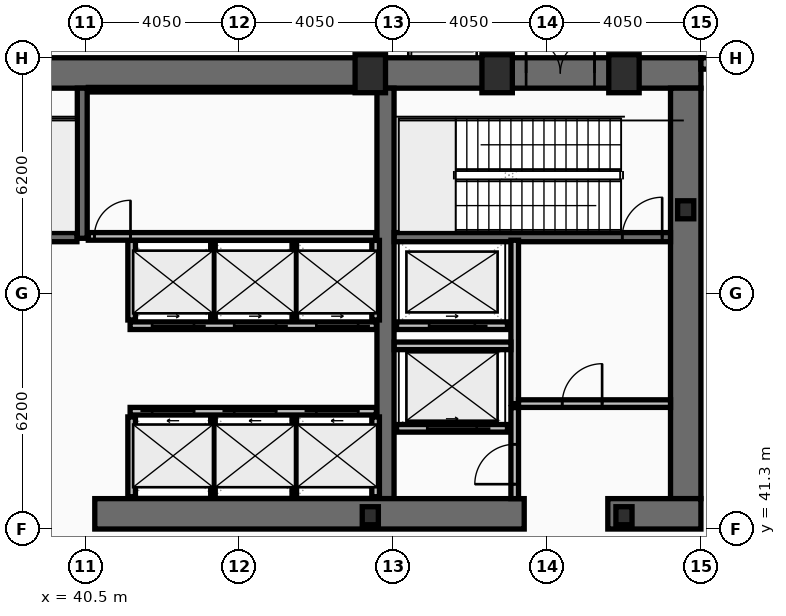
"""IFC4 building model, lengths in metres.
Left out: names, types, materials, properties, quantities, classifications, styles, units other than length and angle.
Written with IfcOpenShell. Run it as: python <this file> out.ifc"""

import sys

from ifc_helpers import new_model, si_unit, direction, frame, frame_2d, origin, origin_2d, place, context, subcontext, project, spatial, rectangle, hollow_rectangle, i_section, extrude, element, fill, save


model = new_model("IFC4")
c1 = context("Model", 3, precision=1e-05, world=origin(), true_north=direction((0.0, 1.0)))
c2 = subcontext(c1, "Body", "Model", "MODEL_VIEW")
j1 = project(units=[si_unit("LENGTHUNIT", "METRE"), si_unit("PLANEANGLEUNIT", "RADIAN")], contexts=[c1])
p1 = place(None, origin())
s1 = spatial("IfcSite", under=j1, at=p1, CompositionType="ELEMENT")
p2 = place(p1, origin())
s2 = spatial("IfcBuilding", under=s1, at=p2, CompositionType="ELEMENT")
p3 = place(p2, origin())
s3 = spatial("IfcBuildingStorey", under=s2, at=p3, CompositionType="ELEMENT", Elevation=0.0)
p4 = place(p3, frame((16.2, 53.3, 0.0), z_axis=(0.0, 0.0, 1.0), x_axis=(1.0, 0.0, 0.0)))
e1 = element("IfcWall", 1, at=p4, inside=s3, PredefinedType="SHEAR", context=c2, shape_type="SweptSolid", body=[
    extrude(rectangle(XDim=40.5, YDim=0.8, at=frame_2d((20.25, 0.0))), origin(), (0.0, 0.0, 1.0), 5.2),
])
p5 = place(p4, frame((2.8, 0.0, 0.0)))
e2 = element("IfcOpeningElement", 2, at=p5, cuts=e1, PredefinedType="OPENING", context=c2, shape_type="SweptSolid", body=[
    extrude(rectangle(XDim=1.8, YDim=2.4, at=frame_2d((0.9, 1.2))), frame((0.0, 0.41, 0.0), z_axis=(0.0, -1.0, 0.0), x_axis=(1.0, 0.0, 0.0)), (0.0, 0.0, 1.0), 0.82),
])
p6 = place(p4, frame((19.3, 0.0, 0.0)))
e3 = element("IfcOpeningElement", 3, at=p6, cuts=e1, PredefinedType="OPENING", context=c2, shape_type="SweptSolid", body=[
    extrude(rectangle(XDim=1.8, YDim=2.4, at=frame_2d((0.9, 1.2))), frame((0.0, 0.41, 0.0), z_axis=(0.0, -1.0, 0.0), x_axis=(1.0, 0.0, 0.0)), (0.0, 0.0, 1.0), 0.82),
])
p7 = place(p4, frame((35.9, 0.0, 0.0)))
e4 = element("IfcOpeningElement", 4, at=p7, cuts=e1, PredefinedType="OPENING", context=c2, shape_type="SweptSolid", body=[
    extrude(rectangle(XDim=1.8, YDim=2.4, at=frame_2d((0.9, 1.2))), frame((0.0, 0.41, 0.0), z_axis=(0.0, -1.0, 0.0), x_axis=(1.0, 0.0, 0.0)), (0.0, 0.0, 1.0), 0.82),
])
p8 = place(p3, frame((56.3, 52.9, 0.0), z_axis=(0.0, 0.0, 1.0), x_axis=(0.0, -1.0, 0.0)))
e5 = element("IfcWall", 5, at=p8, inside=s3, PredefinedType="SHEAR", context=c2, shape_type="SweptSolid", body=[
    extrude(rectangle(XDim=10.8, YDim=0.8, at=frame_2d((5.4, 0.0))), origin(), (0.0, 0.0, 1.0), 5.2),
])
p9 = place(p3, frame((48.4, 42.1, 0.0), z_axis=(0.0, 0.0, 1.0), x_axis=(0.0, 1.0, 0.0)))
e6 = element("IfcWall", 6, at=p9, inside=s3, PredefinedType="SHEAR", context=c2, shape_type="SweptSolid", body=[
    extrude(rectangle(XDim=10.8, YDim=0.45, at=frame_2d((5.4, 0.0))), origin(), (0.0, 0.0, 1.0), 5.2),
])
p10 = place(p3, frame((52.05, 41.7, 0.0), z_axis=(0.0, 0.0, 1.0), x_axis=(-1.0, 0.0, 0.0)))
e7 = element("IfcWall", 7, at=p10, inside=s3, PredefinedType="SHEAR", context=c2, shape_type="SweptSolid", body=[
    extrude(rectangle(XDim=11.3, YDim=0.8, at=frame_2d((5.65, 0.0))), origin(), (0.0, 0.0, 1.0), 5.2),
])
p11 = place(p3, frame((56.7, 41.7, 0.0), z_axis=(0.0, 0.0, 1.0), x_axis=(-1.0, 0.0, 0.0)))
e8 = element("IfcWall", 8, at=p11, inside=s3, PredefinedType="SHEAR", context=c2, shape_type="SweptSolid", body=[
    extrude(rectangle(XDim=2.45, YDim=0.8, at=frame_2d((1.225, 0.0))), origin(), (0.0, 0.0, 1.0), 5.2),
])
p12 = place(p3, frame((40.42, 48.95, 0.0), z_axis=(0.0, 0.0, 1.0), x_axis=(0.0, 1.0, 0.0)))
e9 = element("IfcWall", 9, at=p12, inside=s3, PredefinedType="SHEAR", context=c2, shape_type="SweptSolid", body=[
    extrude(rectangle(XDim=3.95, YDim=0.26, at=frame_2d((1.975, 0.0))), origin(), (0.0, 0.0, 1.0), 5.2),
])
p13 = place(p3, frame((48.63, 48.98, 0.0), z_axis=(0.0, 0.0, 1.0), x_axis=(1.0, 0.0, 0.0)))
e10 = element("IfcWall", 10, at=p13, inside=s3, PredefinedType="SHEAR", context=c2, shape_type="SweptSolid", body=[
    extrude(rectangle(XDim=7.27, YDim=0.24, at=frame_2d((3.635, 0.0))), origin(), (0.0, 0.0, 1.0), 5.2),
])
p14 = place(p13, frame((6.0, 0.0, 0.0)))
e11 = element("IfcOpeningElement", 11, at=p14, cuts=e10, PredefinedType="OPENING", context=c2, shape_type="SweptSolid", body=[
    extrude(rectangle(XDim=1.05, YDim=2.15, at=frame_2d((0.525, 1.075))), frame((0.0, 0.13, 0.0), z_axis=(0.0, -1.0, 0.0), x_axis=(1.0, 0.0, 0.0)), (0.0, 0.0, 1.0), 0.26),
])
p15 = place(p3, frame((32.72, 48.98, 0.0), z_axis=(0.0, 0.0, 1.0), x_axis=(1.0, 0.0, 0.0)))
e12 = element("IfcWall", 12, at=p15, inside=s3, PredefinedType="SHEAR", context=c2, shape_type="SweptSolid", body=[
    extrude(rectangle(XDim=7.56, YDim=0.24, at=frame_2d((3.78, 0.0))), origin(), (0.0, 0.0, 1.0), 5.2),
])
p16 = place(p15, frame((0.22, 0.0, 0.0)))
e13 = element("IfcOpeningElement", 13, at=p16, cuts=e12, PredefinedType="OPENING", context=c2, shape_type="SweptSolid", body=[
    extrude(rectangle(XDim=1.05, YDim=2.15, at=frame_2d((0.525, 1.075))), frame((0.0, 0.13, 0.0), z_axis=(0.0, -1.0, 0.0), x_axis=(1.0, 0.0, 0.0)), (0.0, 0.0, 1.0), 0.26),
])
for number, where, z_axis, x_axis in (
    (14, (48.0, 53.28, 0.0), (0.0, 0.0, 1.0), (1.0, 0.0, 0.0)),
    (15, (51.337, 53.28, 0.0), (0.0, 0.0, 1.0), (1.0, 0.0, 0.0)),
    (16, (54.675, 53.28, 0.0), (0.0, 0.0, 1.0), (1.0, 0.0, 0.0)),
):
    element("IfcColumn", number, at=place(p3, frame(where, z_axis=z_axis, x_axis=x_axis)), inside=s3, PredefinedType="COLUMN", context=c2, shape_type="SweptSolid", body=[
        extrude(hollow_rectangle(XDim=0.8, YDim=1.0, WallThickness=0.055, at=origin_2d()), origin(), (0.0, 0.0, 1.0), 5.4),
    ])
for number, where, z_axis, x_axis in (
    (17, (56.3, 49.7, 0.0), (0.0, 0.0, 1.0), (1.0, 0.0, 0.0)),
    (18, (48.0, 41.65, 0.0), (0.0, 0.0, 1.0), (1.0, 0.0, 0.0)),
    (19, (54.675, 41.65, 0.0), (0.0, 0.0, 1.0), (1.0, 0.0, 0.0)),
):
    element("IfcColumn", number, at=place(p3, frame(where, z_axis=z_axis, x_axis=x_axis)), inside=s3, PredefinedType="COLUMN", context=c2, shape_type="SweptSolid", body=[
        extrude(i_section(OverallWidth=0.424, OverallDepth=0.474, WebThickness=0.048, FlangeThickness=0.077, at=origin_2d()), origin(), (0.0, 0.0, 1.0), 5.4),
    ])
p17 = place(p3, frame((56.7, 53.55, 0.0), z_axis=(0.0, 0.0, 1.0), x_axis=(1.0, 0.0, 0.0)))
e20 = element("IfcWall", 20, at=p17, inside=s3, PredefinedType="SOLIDWALL", context=c2, shape_type="SweptSolid", body=[
    extrude(rectangle(XDim=12.325, YDim=0.3, at=frame_2d((6.163, 0.0))), origin(), (0.0, 0.0, 1.0), 4.54),
])
p18 = place(p17, frame((1.95, 0.0, 0.0)))
e21 = element("IfcOpeningElement", 21, at=p18, cuts=e20, PredefinedType="OPENING", context=c2, shape_type="SweptSolid", body=[
    extrude(rectangle(XDim=1.8, YDim=2.4, at=frame_2d((0.9, 1.2))), frame((0.0, 0.16, 0.0), z_axis=(0.0, -1.0, 0.0), x_axis=(1.0, 0.0, 0.0)), (0.0, 0.0, 1.0), 0.32),
])
p19 = place(p17, frame((7.75, 0.0, 1.0)))
e22 = element("IfcOpeningElement", 22, at=p19, cuts=e20, PredefinedType="OPENING", context=c2, shape_type="SweptSolid", body=[
    extrude(rectangle(XDim=1.2, YDim=2.8, at=frame_2d((0.6, 1.4))), frame((0.0, 0.16, 0.0), z_axis=(0.0, -1.0, 0.0), x_axis=(1.0, 0.0, 0.0)), (0.0, 0.0, 1.0), 0.32),
])
p20 = place(p3, frame((41.68, 44.4, 0.0), z_axis=(0.0, 0.0, 1.0), x_axis=(1.0, 0.0, 0.0)))
e23 = element("IfcWall", 23, at=p20, inside=s3, PredefinedType="PARTITIONING", context=c2, shape_type="SweptSolid", body=[
    extrude(rectangle(XDim=6.48, YDim=0.2, at=frame_2d((3.24, 0.0))), origin(), (0.0, 0.0, 1.0), 5.2),
])
p21 = place(p20, frame((0.58, 0.0, 0.0)))
e24 = element("IfcOpeningElement", 24, at=p21, cuts=e23, PredefinedType="OPENING", context=c2, shape_type="SweptSolid", body=[
    extrude(rectangle(XDim=1.1, YDim=2.18, at=frame_2d((0.55, 1.09))), frame((0.0, 0.11, 0.0), z_axis=(0.0, -1.0, 0.0), x_axis=(1.0, 0.0, 0.0)), (0.0, 0.0, 1.0), 0.22),
])
p22 = place(p20, frame((2.74, 0.0, 0.0)))
e25 = element("IfcOpeningElement", 25, at=p22, cuts=e23, PredefinedType="OPENING", context=c2, shape_type="SweptSolid", body=[
    extrude(rectangle(XDim=1.1, YDim=2.18, at=frame_2d((0.55, 1.09))), frame((0.0, 0.11, 0.0), z_axis=(0.0, -1.0, 0.0), x_axis=(1.0, 0.0, 0.0)), (0.0, 0.0, 1.0), 0.22),
])
p23 = place(p20, frame((4.9, 0.0, 0.0)))
e26 = element("IfcOpeningElement", 26, at=p23, cuts=e23, PredefinedType="OPENING", context=c2, shape_type="SweptSolid", body=[
    extrude(rectangle(XDim=1.1, YDim=2.18, at=frame_2d((0.55, 1.09))), frame((0.0, 0.11, 0.0), z_axis=(0.0, -1.0, 0.0), x_axis=(1.0, 0.0, 0.0)), (0.0, 0.0, 1.0), 0.22),
])
p24 = place(p3, frame((51.61, 43.95, 0.0), z_axis=(0.0, 0.0, 1.0), x_axis=(-1.0, 0.0, 0.0)))
e27 = element("IfcWall", 27, at=p24, inside=s3, PredefinedType="PARTITIONING", context=c2, shape_type="SweptSolid", body=[
    extrude(rectangle(XDim=2.92, YDim=0.2, at=frame_2d((1.46, 0.0))), origin(), (0.0, 0.0, 1.0), 5.2),
])
p25 = place(p24, frame((0.81, 0.0, 0.0)))
e28 = element("IfcOpeningElement", 28, at=p25, cuts=e27, PredefinedType="OPENING", context=c2, shape_type="SweptSolid", body=[
    extrude(rectangle(XDim=1.3, YDim=2.18, at=frame_2d((0.65, 1.09))), frame((0.0, 0.11, 0.0), z_axis=(0.0, -1.0, 0.0), x_axis=(1.0, 0.0, 0.0)), (0.0, 0.0, 1.0), 0.22),
])
p26 = place(p3, frame((51.61, 46.65, 0.0), z_axis=(0.0, 0.0, 1.0), x_axis=(-1.0, 0.0, 0.0)))
e29 = element("IfcWall", 29, at=p26, inside=s3, PredefinedType="PARTITIONING", context=c2, shape_type="SweptSolid", body=[
    extrude(rectangle(XDim=2.92, YDim=0.2, at=frame_2d((1.46, 0.0))), origin(), (0.0, 0.0, 1.0), 5.2),
])
p27 = place(p26, frame((0.86, 0.0, 0.0)))
e30 = element("IfcOpeningElement", 30, at=p27, cuts=e29, PredefinedType="OPENING", context=c2, shape_type="SweptSolid", body=[
    extrude(rectangle(XDim=1.2, YDim=2.18, at=frame_2d((0.6, 1.09))), frame((0.0, 0.11, 0.0), z_axis=(0.0, -1.0, 0.0), x_axis=(1.0, 0.0, 0.0)), (0.0, 0.0, 1.0), 0.22),
])
p28 = place(p3, frame((48.16, 46.65, 0.0), z_axis=(0.0, 0.0, 1.0), x_axis=(-1.0, 0.0, 0.0)))
e31 = element("IfcWall", 31, at=p28, inside=s3, PredefinedType="PARTITIONING", context=c2, shape_type="SweptSolid", body=[
    extrude(rectangle(XDim=6.48, YDim=0.2, at=frame_2d((3.24, 0.0))), origin(), (0.0, 0.0, 1.0), 5.2),
])
p29 = place(p28, frame((4.8, 0.0, 0.0)))
e32 = element("IfcOpeningElement", 32, at=p29, cuts=e31, PredefinedType="OPENING", context=c2, shape_type="SweptSolid", body=[
    extrude(rectangle(XDim=1.1, YDim=2.18, at=frame_2d((0.55, 1.09))), frame((0.0, 0.11, 0.0), z_axis=(0.0, -1.0, 0.0), x_axis=(1.0, 0.0, 0.0)), (0.0, 0.0, 1.0), 0.22),
])
p30 = place(p28, frame((2.64, 0.0, 0.0)))
e33 = element("IfcOpeningElement", 33, at=p30, cuts=e31, PredefinedType="OPENING", context=c2, shape_type="SweptSolid", body=[
    extrude(rectangle(XDim=1.1, YDim=2.18, at=frame_2d((0.55, 1.09))), frame((0.0, 0.11, 0.0), z_axis=(0.0, -1.0, 0.0), x_axis=(1.0, 0.0, 0.0)), (0.0, 0.0, 1.0), 0.22),
])
p31 = place(p28, frame((0.48, 0.0, 0.0)))
e34 = element("IfcOpeningElement", 34, at=p31, cuts=e31, PredefinedType="OPENING", context=c2, shape_type="SweptSolid", body=[
    extrude(rectangle(XDim=1.1, YDim=2.18, at=frame_2d((0.55, 1.09))), frame((0.0, 0.11, 0.0), z_axis=(0.0, -1.0, 0.0), x_axis=(1.0, 0.0, 0.0)), (0.0, 0.0, 1.0), 0.22),
])
p32 = place(p3, frame((51.8, 44.6, 0.0), z_axis=(0.0, 0.0, 1.0), x_axis=(0.0, 1.0, 0.0)))
e35 = element("IfcWall", 35, at=p32, inside=s3, PredefinedType="PARTITIONING", context=c2, shape_type="SweptSolid", body=[
    extrude(rectangle(XDim=4.3, YDim=0.2, at=frame_2d((2.15, 0.0))), origin(), (0.0, 0.0, 1.0), 5.2),
])
p33 = place(p3, frame((51.9, 44.6, 0.0), z_axis=(0.0, 0.0, 1.0), x_axis=(1.0, 0.0, 0.0)))
e36 = element("IfcWall", 36, at=p33, inside=s3, PredefinedType="PARTITIONING", context=c2, shape_type="SweptSolid", body=[
    extrude(rectangle(XDim=4.0, YDim=0.2, at=frame_2d((2.0, 0.0))), origin(), (0.0, 0.0, 1.0), 5.2),
])
p34 = place(p33, frame((1.15, 0.0, 0.0)))
e37 = element("IfcOpeningElement", 37, at=p34, cuts=e36, PredefinedType="OPENING", context=c2, shape_type="SweptSolid", body=[
    extrude(rectangle(XDim=1.05, YDim=2.15, at=frame_2d((0.525, 1.075))), frame((0.0, 0.11, 0.0), z_axis=(0.0, -1.0, 0.0), x_axis=(1.0, 0.0, 0.0)), (0.0, 0.0, 1.0), 0.22),
])
p35 = place(p3, frame((48.63, 46.12, 0.0), z_axis=(0.0, 0.0, 1.0), x_axis=(1.0, 0.0, 0.0)))
e38 = element("IfcWall", 38, at=p35, inside=s3, PredefinedType="PARTITIONING", context=c2, shape_type="SweptSolid", body=[
    extrude(rectangle(XDim=3.07, YDim=0.2, at=frame_2d((1.535, 0.0))), origin(), (0.0, 0.0, 1.0), 5.2),
])
p36 = place(p3, frame((51.8, 42.1, 0.0), z_axis=(0.0, 0.0, 1.0), x_axis=(0.0, 1.0, 0.0)))
e39 = element("IfcWall", 39, at=p36, inside=s3, PredefinedType="PARTITIONING", context=c2, shape_type="SweptSolid", body=[
    extrude(rectangle(XDim=2.395, YDim=0.2, at=frame_2d((1.198, 0.0))), origin(), (0.0, 0.0, 1.0), 5.2),
])
p37 = place(p36, frame((0.38, 0.0, 0.0)))
e40 = element("IfcOpeningElement", 40, at=p37, cuts=e39, PredefinedType="OPENING", context=c2, shape_type="SweptSolid", body=[
    extrude(rectangle(XDim=1.05, YDim=2.15, at=frame_2d((0.525, 1.075))), frame((0.0, 0.11, 0.0), z_axis=(0.0, -1.0, 0.0), x_axis=(1.0, 0.0, 0.0)), (0.0, 0.0, 1.0), 0.22),
])
for number, where, z_axis, x_axis in (
    (41, (41.72, 46.8, 0.0), (0.0, 0.0, 1.0), (0.0, 1.0, 0.0)),
    (42, (48.14, 46.8, 0.0), (0.0, 0.0, 1.0), (0.0, 1.0, 0.0)),
):
    element("IfcWall", number, at=place(p3, frame(where, z_axis=z_axis, x_axis=x_axis)), inside=s3, PredefinedType="PARTITIONING", context=c2, shape_type="SweptSolid", body=[
        extrude(rectangle(XDim=2.095, YDim=0.2, at=frame_2d((1.047, 0.0))), origin(), (0.0, 0.0, 1.0), 5.2),
    ])
for number, where, z_axis, x_axis in (
    (43, (43.86, 46.8, 0.0), (0.0, 0.0, 1.0), (0.0, 1.0, 0.0)),
    (44, (46.0, 46.8, 0.0), (0.0, 0.0, 1.0), (0.0, 1.0, 0.0)),
):
    element("IfcWall", number, at=place(p3, frame(where, z_axis=z_axis, x_axis=x_axis)), inside=s3, PredefinedType="PARTITIONING", context=c2, shape_type="SweptSolid", body=[
        extrude(rectangle(XDim=2.095, YDim=0.12, at=frame_2d((1.047, 0.0))), origin(), (0.0, 0.0, 1.0), 5.2),
    ])
for number, where, z_axis, x_axis in (
    (45, (41.72, 42.15, 0.0), (0.0, 0.0, 1.0), (0.0, 1.0, 0.0)),
    (46, (48.14, 42.15, 0.0), (0.0, 0.0, 1.0), (0.0, 1.0, 0.0)),
):
    element("IfcWall", number, at=place(p3, frame(where, z_axis=z_axis, x_axis=x_axis)), inside=s3, PredefinedType="PARTITIONING", context=c2, shape_type="SweptSolid", body=[
        extrude(rectangle(XDim=2.1, YDim=0.2, at=frame_2d((1.05, 0.0))), origin(), (0.0, 0.0, 1.0), 5.2),
    ])
for number, where, z_axis, x_axis in (
    (47, (43.86, 42.15, 0.0), (0.0, 0.0, 1.0), (0.0, 1.0, 0.0)),
    (48, (46.0, 42.15, 0.0), (0.0, 0.0, 1.0), (0.0, 1.0, 0.0)),
):
    element("IfcWall", number, at=place(p3, frame(where, z_axis=z_axis, x_axis=x_axis)), inside=s3, PredefinedType="PARTITIONING", context=c2, shape_type="SweptSolid", body=[
        extrude(rectangle(XDim=2.1, YDim=0.12, at=frame_2d((1.05, 0.0))), origin(), (0.0, 0.0, 1.0), 5.2),
    ])
p38 = place(p3, frame((40.58, 52.86, 0.0), z_axis=(0.0, 0.0, 1.0), x_axis=(1.0, 0.0, 0.0)))
e49 = element("IfcWall", 49, at=p38, inside=s3, PredefinedType="PARTITIONING", context=c2, shape_type="SweptSolid", body=[
    extrude(rectangle(XDim=7.56, YDim=0.12, at=frame_2d((3.78, 0.0))), origin(), (0.0, 0.0, 1.0), 5.2),
])
p39 = place(p3, frame((40.58, 49.0, 0.0), z_axis=(0.0, 0.0, 1.0), x_axis=(1.0, 0.0, 0.0)))
e50 = element("IfcWall", 50, at=p39, inside=s3, PredefinedType="PARTITIONING", context=c2, shape_type="SweptSolid", body=[
    extrude(rectangle(XDim=7.56, YDim=0.2, at=frame_2d((3.78, 0.0))), origin(), (0.0, 0.0, 1.0), 5.2),
])
p40 = place(p39, frame((0.16, 0.0, 0.0)))
e51 = element("IfcOpeningElement", 51, at=p40, cuts=e50, PredefinedType="OPENING", context=c2, shape_type="SweptSolid", body=[
    extrude(rectangle(XDim=0.95, YDim=2.1, at=frame_2d((0.475, 1.05))), frame((0.0, 0.11, 0.0), z_axis=(0.0, -1.0, 0.0), x_axis=(1.0, 0.0, 0.0)), (0.0, 0.0, 1.0), 0.22),
])
p41 = place(p7, origin())
e52 = element("IfcDoor", 52, at=p41, inside=s3, OperationType="DOUBLE_DOOR_SINGLE_SWING", PredefinedType="DOOR", context=c2, shape_type="SweptSolid", body=[
    extrude(rectangle(XDim=1.8, YDim=2.4, at=frame_2d((0.9, 1.2))), frame((0.0, 0.025, 0.0), z_axis=(0.0, -1.0, 0.0), x_axis=(1.0, 0.0, 0.0)), (0.0, 0.0, 1.0), 0.05),
])
fill(e4, e52)
p42 = place(p14, origin())
e53 = element("IfcDoor", 53, at=p42, inside=s3, OperationType="SINGLE_SWING_RIGHT", PredefinedType="DOOR", context=c2, shape_type="SweptSolid", body=[
    extrude(rectangle(XDim=1.05, YDim=2.15, at=frame_2d((0.525, 1.075))), frame((0.0, 0.025, 0.0), z_axis=(0.0, -1.0, 0.0), x_axis=(1.0, 0.0, 0.0)), (0.0, 0.0, 1.0), 0.05),
])
fill(e11, e53)
p43 = place(p21, origin())
e54 = element("IfcDoor", 54, at=p43, inside=s3, OperationType="SLIDING_TO_LEFT", PredefinedType="DOOR", context=c2, shape_type="SweptSolid", body=[
    extrude(rectangle(XDim=1.1, YDim=2.18, at=frame_2d((0.55, 1.09))), frame((0.0, 0.025, 0.0), z_axis=(0.0, -1.0, 0.0), x_axis=(1.0, 0.0, 0.0)), (0.0, 0.0, 1.0), 0.05),
])
fill(e24, e54)
p44 = place(p22, origin())
e55 = element("IfcDoor", 55, at=p44, inside=s3, OperationType="SLIDING_TO_LEFT", PredefinedType="DOOR", context=c2, shape_type="SweptSolid", body=[
    extrude(rectangle(XDim=1.1, YDim=2.18, at=frame_2d((0.55, 1.09))), frame((0.0, 0.025, 0.0), z_axis=(0.0, -1.0, 0.0), x_axis=(1.0, 0.0, 0.0)), (0.0, 0.0, 1.0), 0.05),
])
fill(e25, e55)
p45 = place(p23, origin())
e56 = element("IfcDoor", 56, at=p45, inside=s3, OperationType="SLIDING_TO_LEFT", PredefinedType="DOOR", context=c2, shape_type="SweptSolid", body=[
    extrude(rectangle(XDim=1.1, YDim=2.18, at=frame_2d((0.55, 1.09))), frame((0.0, 0.025, 0.0), z_axis=(0.0, -1.0, 0.0), x_axis=(1.0, 0.0, 0.0)), (0.0, 0.0, 1.0), 0.05),
])
fill(e26, e56)
p46 = place(p25, origin())
e57 = element("IfcDoor", 57, at=p46, inside=s3, OperationType="SLIDING_TO_LEFT", PredefinedType="DOOR", context=c2, shape_type="SweptSolid", body=[
    extrude(rectangle(XDim=1.3, YDim=2.18, at=frame_2d((0.65, 1.09))), frame((0.0, 0.025, 0.0), z_axis=(0.0, -1.0, 0.0), x_axis=(1.0, 0.0, 0.0)), (0.0, 0.0, 1.0), 0.05),
])
fill(e28, e57)
p47 = place(p27, origin())
e58 = element("IfcDoor", 58, at=p47, inside=s3, OperationType="SLIDING_TO_LEFT", PredefinedType="DOOR", context=c2, shape_type="SweptSolid", body=[
    extrude(rectangle(XDim=1.2, YDim=2.18, at=frame_2d((0.6, 1.09))), frame((0.0, 0.025, 0.0), z_axis=(0.0, -1.0, 0.0), x_axis=(1.0, 0.0, 0.0)), (0.0, 0.0, 1.0), 0.05),
])
fill(e30, e58)
p48 = place(p29, origin())
e59 = element("IfcDoor", 59, at=p48, inside=s3, OperationType="SLIDING_TO_LEFT", PredefinedType="DOOR", context=c2, shape_type="SweptSolid", body=[
    extrude(rectangle(XDim=1.1, YDim=2.18, at=frame_2d((0.55, 1.09))), frame((0.0, 0.025, 0.0), z_axis=(0.0, -1.0, 0.0), x_axis=(1.0, 0.0, 0.0)), (0.0, 0.0, 1.0), 0.05),
])
fill(e32, e59)
p49 = place(p30, origin())
e60 = element("IfcDoor", 60, at=p49, inside=s3, OperationType="SLIDING_TO_LEFT", PredefinedType="DOOR", context=c2, shape_type="SweptSolid", body=[
    extrude(rectangle(XDim=1.1, YDim=2.18, at=frame_2d((0.55, 1.09))), frame((0.0, 0.025, 0.0), z_axis=(0.0, -1.0, 0.0), x_axis=(1.0, 0.0, 0.0)), (0.0, 0.0, 1.0), 0.05),
])
fill(e33, e60)
p50 = place(p31, origin())
e61 = element("IfcDoor", 61, at=p50, inside=s3, OperationType="SLIDING_TO_LEFT", PredefinedType="DOOR", context=c2, shape_type="SweptSolid", body=[
    extrude(rectangle(XDim=1.1, YDim=2.18, at=frame_2d((0.55, 1.09))), frame((0.0, 0.025, 0.0), z_axis=(0.0, -1.0, 0.0), x_axis=(1.0, 0.0, 0.0)), (0.0, 0.0, 1.0), 0.05),
])
fill(e34, e61)
p51 = place(p34, origin())
e62 = element("IfcDoor", 62, at=p51, inside=s3, OperationType="SINGLE_SWING_RIGHT", PredefinedType="DOOR", context=c2, shape_type="SweptSolid", body=[
    extrude(rectangle(XDim=1.05, YDim=2.15, at=frame_2d((0.525, 1.075))), frame((0.0, 0.025, 0.0), z_axis=(0.0, -1.0, 0.0), x_axis=(1.0, 0.0, 0.0)), (0.0, 0.0, 1.0), 0.05),
])
fill(e37, e62)
p52 = place(p37, origin())
e63 = element("IfcDoor", 63, at=p52, inside=s3, OperationType="SINGLE_SWING_LEFT", PredefinedType="DOOR", context=c2, shape_type="SweptSolid", body=[
    extrude(rectangle(XDim=1.05, YDim=2.15, at=frame_2d((0.525, 1.075))), frame((0.0, 0.025, 0.0), z_axis=(0.0, -1.0, 0.0), x_axis=(1.0, 0.0, 0.0)), (0.0, 0.0, 1.0), 0.05),
])
fill(e40, e63)
p53 = place(p40, origin())
e64 = element("IfcDoor", 64, at=p53, inside=s3, OperationType="SINGLE_SWING_RIGHT", PredefinedType="DOOR", context=c2, shape_type="SweptSolid", body=[
    extrude(rectangle(XDim=0.95, YDim=2.1, at=frame_2d((0.475, 1.05))), frame((0.0, 0.025, 0.0), z_axis=(0.0, -1.0, 0.0), x_axis=(1.0, 0.0, 0.0)), (0.0, 0.0, 1.0), 0.05),
])
fill(e51, e64)
save(model, sys.argv[1])
